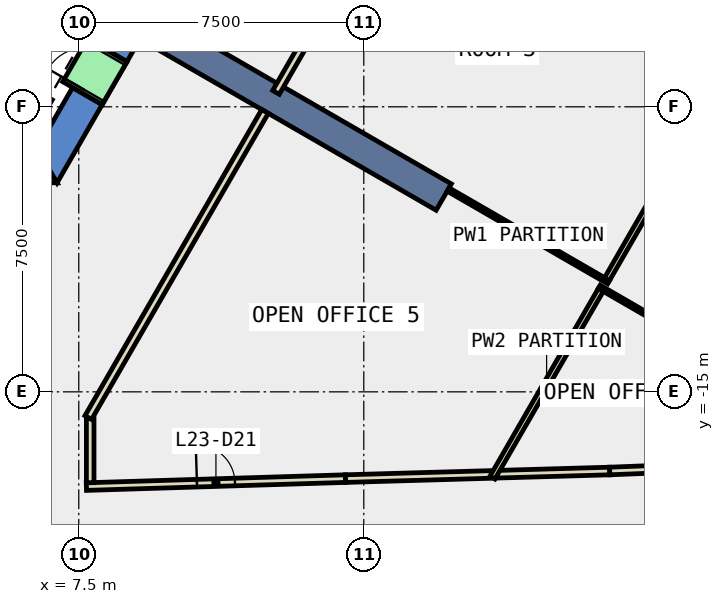
"""IFC4 building model, lengths in metres.
Left out: names, types, materials, properties, quantities, classifications, styles, units other than length and angle.
Written with IfcOpenShell. Run it as: python <this file> out.ifc"""

import sys

from ifc_helpers import new_model, si_unit, direction, frame, frame_2d, origin, place, context, subcontext, project, spatial, polyline, rectangle, outline, extrude, element, fill, save


model = new_model("IFC4")
c1 = context("Model", 3, precision=1e-05, world=origin(), true_north=direction((0.0, 1.0)))
c2 = subcontext(c1, "Body", "Model", "MODEL_VIEW")
j1 = project(units=[si_unit("LENGTHUNIT", "METRE"), si_unit("PLANEANGLEUNIT", "RADIAN")], contexts=[c1])
p1 = place(None, origin())
s1 = spatial("IfcSite", under=j1, at=p1, CompositionType="ELEMENT")
p2 = place(p1, origin())
s2 = spatial("IfcBuilding", under=s1, at=p2, CompositionType="ELEMENT")
p3 = place(p2, frame((0.0, 0.0, 107.6)))
s3 = spatial("IfcBuildingStorey", under=s2, at=p3, CompositionType="ELEMENT", Elevation=107.6)
p4 = place(p3, frame((0.0, 0.0, -0.4)))
e1 = element("IfcWall", 1, at=p4, inside=s3, PredefinedType="SHEAR", context=c2, shape_type="SweptSolid", body=[
    extrude(outline(polyline([(5.75, -8.6), (5.75, -9.5), (6.928, -9.5), (6.409, -8.6), (5.75, -8.6)])), origin(), (0.0, 0.0, 1.0), 4.2),
])
p5 = place(p3, frame((0.0, 0.0, -0.4)))
e2 = element("IfcWall", 2, at=p5, inside=s3, PredefinedType="SHEAR", context=c2, shape_type="SweptSolid", body=[
    extrude(outline(polyline([(8.117, -7.44), (7.338, -6.99), (6.409, -8.6), (6.928, -9.5), (8.117, -7.44)])), origin(), (0.0, 0.0, 1.0), 4.2),
])
p6 = place(p3, frame((0.0, 0.0, -0.4)))
e3 = element("IfcWall", 3, at=p6, inside=s3, PredefinedType="SHEAR", context=c2, shape_type="SweptSolid", body=[
    extrude(outline(polyline([(9.417, -5.189), (8.638, -4.739), (7.988, -5.864), (8.767, -6.314), (9.417, -5.189)])), origin(), (0.0, 0.0, 1.0), 4.2),
])
p7 = place(p3, frame((0.0, 0.0, 3.6)))
e4 = element("IfcWall", 4, at=p7, inside=s3, PredefinedType="SHEAR", context=c2, shape_type="SweptSolid", body=[
    extrude(outline(polyline([(8.767, -6.314), (7.988, -5.864), (7.338, -6.99), (8.117, -7.44), (8.767, -6.314)])), origin(), (0.0, 0.0, 1.0), 0.2),
])
p8 = place(p3, frame((9.31, -5.375, -0.4), z_axis=(0.0, 0.0, 1.0), x_axis=(0.866017533419, -0.500013631625, 0.0)))
e5 = element("IfcWall", 5, at=p8, inside=s3, PredefinedType="SHEAR", context=c2, shape_type="SweptSolid", body=[
    extrude(rectangle(XDim=9.0, YDim=0.8, at=frame_2d((4.5, 0.0))), origin(), (0.0, 0.0, 1.0), 4.2),
])
p9 = place(p3, frame((7.7, -17.493, 0.0), z_axis=(0.0, 0.0, 1.0), x_axis=(0.999526319751, 0.030775576778, 0.0)))
e6 = element("IfcWall", 6, at=p9, inside=s3, PredefinedType="PARTITIONING", context=c2, shape_type="SweptSolid", body=[
    extrude(rectangle(XDim=6.822, YDim=0.2, at=frame_2d((3.411, 0.0))), origin(), (0.0, 0.0, 1.0), 3.8),
])
p10 = place(p9, frame((2.911, 0.0, 0.0)))
e7 = element("IfcOpeningElement", 7, at=p10, cuts=e6, PredefinedType="OPENING", context=c2, shape_type="SweptSolid", body=[
    extrude(rectangle(XDim=1.0, YDim=2.1, at=frame_2d((0.5, 1.05))), frame((0.0, 0.11, 0.0), z_axis=(0.0, -1.0, 0.0), x_axis=(1.0, 0.0, 0.0)), (0.0, 0.0, 1.0), 0.22),
])
p11 = place(p3, frame((14.519, -17.283, 0.0), z_axis=(0.0, 0.0, 1.0), x_axis=(0.999591204998, 0.028590608419, 0.0)))
e8 = element("IfcWall", 8, at=p11, inside=s3, PredefinedType="PARTITIONING", context=c2, shape_type="SweptSolid", body=[
    extrude(rectangle(XDim=3.843, YDim=0.2, at=frame_2d((1.921, 0.0))), origin(), (0.0, 0.0, 1.0), 3.8),
])
p12 = place(p3, frame((24.051, -7.315, 0.0), z_axis=(0.0, 0.0, 1.0), x_axis=(-0.475308630647, 0.87981913234, 0.0)))
e9 = element("IfcWall", 9, at=p12, inside=s3, PredefinedType="PARTITIONING", context=c2, shape_type="SweptSolid", body=[
    extrude(rectangle(XDim=4.166, YDim=0.2, at=frame_2d((2.083, 0.0))), origin(), (0.0, 0.0, 1.0), 3.8),
])
p13 = place(p3, frame((18.509, -17.168, 0.0), z_axis=(0.0, 0.0, 1.0), x_axis=(0.999588854267, 0.028672677323, 0.0)))
e10 = element("IfcWall", 10, at=p13, inside=s3, PredefinedType="PARTITIONING", context=c2, shape_type="SweptSolid", body=[
    extrude(rectangle(XDim=2.963, YDim=0.2, at=frame_2d((1.481, 0.0))), origin(), (0.0, 0.0, 1.0), 3.8),
])
p14 = place(p3, frame((21.471, -17.083, 0.0), z_axis=(0.0, 0.0, 1.0), x_axis=(0.999221407079, 0.039453512338, 0.0)))
e11 = element("IfcWall", 11, at=p14, inside=s3, PredefinedType="PARTITIONING", context=c2, shape_type="SweptSolid", body=[
    extrude(rectangle(XDim=6.083, YDim=0.2, at=frame_2d((3.042, 0.0))), origin(), (0.0, 0.0, 1.0), 3.8),
])
p15 = place(p14, frame((2.541, 0.0, 0.0)))
e12 = element("IfcOpeningElement", 12, at=p15, cuts=e11, PredefinedType="OPENING", context=c2, shape_type="SweptSolid", body=[
    extrude(rectangle(XDim=1.0, YDim=2.1, at=frame_2d((0.5, 1.05))), frame((0.0, 0.11, 0.0), z_axis=(0.0, -1.0, 0.0), x_axis=(1.0, 0.0, 0.0)), (0.0, 0.0, 1.0), 0.22),
])
p16 = place(p3, frame((7.8, -15.69, 0.0), z_axis=(0.0, 0.0, 1.0), x_axis=(0.0, -1.0, 0.0)))
e13 = element("IfcWall", 13, at=p16, inside=s3, PredefinedType="PARTITIONING", context=c2, shape_type="SweptSolid", body=[
    extrude(rectangle(XDim=1.7, YDim=0.2, at=frame_2d((0.85, 0.0))), origin(), (0.0, 0.0, 1.0), 3.8),
])
p17 = place(p3, frame((12.401, -7.621, 0.0), z_axis=(0.0, 0.0, 1.0), x_axis=(-0.499983724212, -0.866034800411, 0.0)))
e14 = element("IfcWall", 14, at=p17, inside=s3, PredefinedType="PARTITIONING", context=c2, shape_type="SweptSolid", body=[
    extrude(rectangle(XDim=9.302, YDim=0.2, at=frame_2d((4.651, 0.0))), origin(), (0.0, 0.0, 1.0), 3.8),
])
p18 = place(p3, frame((18.503, 2.949, 0.0), z_axis=(0.0, 0.0, 1.0), x_axis=(-0.49997390151, -0.86604047123, 0.0)))
e15 = element("IfcWall", 15, at=p18, inside=s3, PredefinedType="PARTITIONING", context=c2, shape_type="SweptSolid", body=[
    extrude(rectangle(XDim=11.626, YDim=0.2, at=frame_2d((5.813, 0.0))), origin(), (0.0, 0.0, 1.0), 3.8),
])
p19 = place(p3, frame((17.219, -9.676, 0.0), z_axis=(0.0, 0.0, 1.0), x_axis=(0.86598459596, -0.500070674565, 0.0)))
e16 = element("IfcWall", 16, at=p19, inside=s3, PredefinedType="PARTITIONING", context=c2, shape_type="SweptSolid", body=[
    extrude(rectangle(XDim=4.875, YDim=0.1, at=frame_2d((2.438, 0.0))), origin(), (0.0, 0.0, 1.0), 3.8),
])
p20 = place(p3, frame((21.236, -12.319, 0.0), z_axis=(0.0, 0.0, 1.0), x_axis=(-0.500016488359, -0.866015884017, 0.0)))
e17 = element("IfcWall", 17, at=p20, inside=s3, PredefinedType="PARTITIONING", context=c2, shape_type="SweptSolid", body=[
    extrude(rectangle(XDim=5.702, YDim=0.15, at=frame_2d((2.851, 0.0))), origin(), (0.0, 0.0, 1.0), 3.8),
])
p21 = place(p3, frame((24.137, -7.294, 0.0), z_axis=(0.0, 0.0, 1.0), x_axis=(-0.500001804394, -0.866024362014, 0.0)))
e18 = element("IfcWall", 18, at=p21, inside=s3, PredefinedType="PARTITIONING", context=c2, shape_type="SweptSolid", body=[
    extrude(rectangle(XDim=5.472, YDim=0.15, at=frame_2d((2.736, 0.0))), origin(), (0.0, 0.0, 1.0), 3.8),
])
p22 = place(p3, frame((21.196, -12.238, 0.0), z_axis=(0.0, 0.0, 1.0), x_axis=(0.866023145199, -0.500003911965, 0.0)))
e19 = element("IfcWall", 19, at=p22, inside=s3, PredefinedType="PARTITIONING", context=c2, shape_type="SweptSolid", body=[
    extrude(rectangle(XDim=8.71, YDim=0.1, at=frame_2d((4.355, 0.0))), origin(), (0.0, 0.0, 1.0), 3.8),
])
p23 = place(p3, frame((4.451, -6.19, 0.0), z_axis=(0.0, 0.0, 1.0), x_axis=(0.50000090737, 0.866024879913, 0.0)))
e20 = element("IfcWall", 20, at=p23, inside=s3, PredefinedType="STANDARD", context=c2, shape_type="SweptSolid", body=[
    extrude(rectangle(XDim=10.6, YDim=0.2, at=frame_2d((5.3, 0.0))), origin(), (0.0, 0.0, 1.0), 3.8),
])
p24 = place(p3, frame((4.588, -6.153, 0.0), z_axis=(0.0, 0.0, 1.0), x_axis=(0.866022959057, -0.500004234368, 0.0)))
e21 = element("IfcWall", 21, at=p24, inside=s3, PredefinedType="STANDARD", context=c2, shape_type="SweptSolid", body=[
    extrude(rectangle(XDim=2.5, YDim=0.2, at=frame_2d((1.25, 0.0))), origin(), (0.0, 0.0, 1.0), 3.8),
])
p25 = place(p3, frame((7.598, -7.14, 0.0), z_axis=(0.0, 0.0, 1.0), x_axis=(0.500362116554, 0.865816234728, 0.0)))
e22 = element("IfcWall", 22, at=p25, inside=s3, PredefinedType="STANDARD", context=c2, shape_type="SweptSolid", body=[
    extrude(rectangle(XDim=1.299, YDim=1.2, at=frame_2d((0.65, 0.0))), origin(), (0.0, 0.0, 1.0), 2.4),
])
p26 = place(p25, frame((0.1, 0.0, 0.0)))
e23 = element("IfcOpeningElement", 23, at=p26, cuts=e22, PredefinedType="OPENING", context=c2, shape_type="SweptSolid", body=[
    extrude(rectangle(XDim=1.1, YDim=2.3, at=frame_2d((0.55, 1.15))), frame((0.0, 0.61, 0.0), z_axis=(0.0, -1.0, 0.0), x_axis=(1.0, 0.0, 0.0)), (0.0, 0.0, 1.0), 1.22),
])
p27 = place(p10, origin())
e24 = element("IfcDoor", 24, at=p27, inside=s3, OperationType="SINGLE_SWING_LEFT", PredefinedType="DOOR", context=c2, shape_type="SweptSolid", body=[
    extrude(rectangle(XDim=1.0, YDim=2.1, at=frame_2d((0.5, 1.05))), frame((0.0, 0.025, 0.0), z_axis=(0.0, -1.0, 0.0), x_axis=(1.0, 0.0, 0.0)), (0.0, 0.0, 1.0), 0.05),
])
fill(e7, e24)
p28 = place(p26, origin())
e25 = element("IfcDoor", 25, at=p28, inside=s3, OperationType="SLIDING_TO_LEFT", PredefinedType="DOOR", context=c2, shape_type="SweptSolid", body=[
    extrude(rectangle(XDim=1.1, YDim=2.3, at=frame_2d((0.55, 1.15))), frame((0.0, 0.025, 0.0), z_axis=(0.0, -1.0, 0.0), x_axis=(1.0, 0.0, 0.0)), (0.0, 0.0, 1.0), 0.05),
])
fill(e23, e25)
save(model, sys.argv[1])
